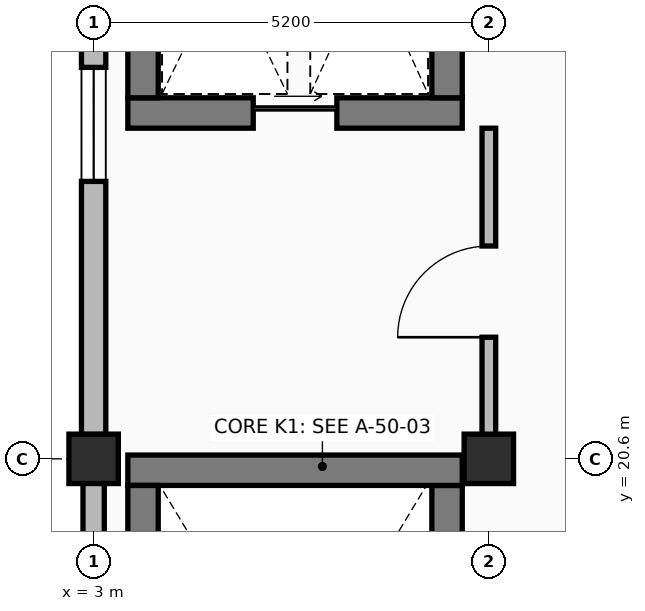
"""IFC4 building model, lengths in metres.
Left out: names, types, materials, properties, quantities, classifications, styles, units other than length and angle.
Written with IfcOpenShell. Run it as: python <this file> out.ifc"""

import sys

from ifc_helpers import new_model, si_unit, direction, frame, frame_2d, origin, origin_2d, place, context, subcontext, project, spatial, rectangle, extrude, element, fill, save


model = new_model("IFC4")
c1 = context("Model", 3, precision=1e-05, world=origin(), true_north=direction((0.0, 1.0)))
c2 = subcontext(c1, "Body", "Model", "MODEL_VIEW")
j1 = project(units=[si_unit("LENGTHUNIT", "METRE"), si_unit("PLANEANGLEUNIT", "RADIAN")], contexts=[c1])
p1 = place(None, origin())
s1 = spatial("IfcSite", under=j1, at=p1, CompositionType="ELEMENT")
p2 = place(p1, origin())
s2 = spatial("IfcBuilding", under=s1, at=p2, CompositionType="ELEMENT")
p3 = place(p2, frame((0.0, 0.0, 14.4)))
s3 = spatial("IfcBuildingStorey", under=s2, at=p3, CompositionType="ELEMENT", Elevation=14.4)
for number, where, z_axis, x_axis in (
    (1, (3.0, 20.6, 0.0), (0.0, 0.0, 1.0), (1.0, 0.0, 0.0)),
    (2, (8.2, 20.6, 0.0), (0.0, 0.0, 1.0), (1.0, 0.0, 0.0)),
):
    element("IfcColumn", number, at=place(p3, frame(where, z_axis=z_axis, x_axis=x_axis)), inside=s3, PredefinedType="COLUMN", context=c2, shape_type="SweptSolid", body=[
        extrude(rectangle(XDim=0.65, YDim=0.65, at=origin_2d()), origin(), (0.0, 0.0, 1.0), 4.5),
    ])
p4 = place(p3, frame((3.0, 20.28, 0.0), z_axis=(0.0, 0.0, 1.0), x_axis=(0.0, -1.0, 0.0)))
e3 = element("IfcWall", 3, at=p4, inside=s3, PredefinedType="SOLIDWALL", context=c2, shape_type="SweptSolid", body=[
    extrude(rectangle(XDim=3.86, YDim=0.28, at=frame_2d((1.93, 0.0))), origin(), (0.0, 0.0, 1.0), 3.475),
])
p5 = place(p4, frame((1.33, 0.0, 0.9)))
e4 = element("IfcOpeningElement", 4, at=p5, cuts=e3, PredefinedType="OPENING", context=c2, shape_type="SweptSolid", body=[
    extrude(rectangle(XDim=1.2, YDim=1.5, at=frame_2d((0.6, 0.75))), frame((0.0, 0.15, 0.0), z_axis=(0.0, -1.0, 0.0), x_axis=(1.0, 0.0, 0.0)), (0.0, 0.0, 1.0), 0.3),
])
p6 = place(p3, frame((3.0, 29.08, 0.0), z_axis=(0.0, 0.0, 1.0), x_axis=(0.0, -1.0, 0.0)))
e5 = element("IfcWall", 5, at=p6, inside=s3, PredefinedType="SOLIDWALL", context=c2, shape_type="SweptSolid", body=[
    extrude(rectangle(XDim=8.16, YDim=0.32, at=frame_2d((4.08, 0.0))), origin(), (0.0, 0.0, 1.0), 3.475),
])
p7 = place(p6, frame((3.33, 0.0, 0.9)))
e6 = element("IfcOpeningElement", 6, at=p7, cuts=e5, PredefinedType="OPENING", context=c2, shape_type="SweptSolid", body=[
    extrude(rectangle(XDim=1.5, YDim=1.5, at=frame_2d((0.75, 0.75))), frame((0.0, 0.17, 0.0), z_axis=(0.0, -1.0, 0.0), x_axis=(1.0, 0.0, 0.0)), (0.0, 0.0, 1.0), 0.34),
])
p8 = place(p3, frame((7.65, 12.6, 0.0), z_axis=(0.0, 0.0, 1.0), x_axis=(0.0, 1.0, 0.0)))
e7 = element("IfcWall", 7, at=p8, inside=s3, PredefinedType="SHEAR", context=c2, shape_type="SweptSolid", body=[
    extrude(rectangle(XDim=7.65, YDim=0.4, at=frame_2d((3.825, 0.0))), origin(), (0.0, 0.0, 1.0), 4.19),
])
p9 = place(p8, frame((0.4, 0.0, 0.0)))
e8 = element("IfcOpeningElement", 8, at=p9, cuts=e7, PredefinedType="OPENING", context=c2, shape_type="SweptSolid", body=[
    extrude(rectangle(XDim=1.1, YDim=2.2, at=frame_2d((0.55, 1.1))), frame((0.0, 0.21, 0.0), z_axis=(0.0, -1.0, 0.0), x_axis=(1.0, 0.0, 0.0)), (0.0, 0.0, 1.0), 0.42),
])
p10 = place(p3, frame((7.85, 20.45, 0.0), z_axis=(0.0, 0.0, 1.0), x_axis=(-1.0, 0.0, 0.0)))
e9 = element("IfcWall", 9, at=p10, inside=s3, PredefinedType="SHEAR", context=c2, shape_type="SweptSolid", body=[
    extrude(rectangle(XDim=4.4, YDim=0.4, at=frame_2d((2.2, 0.0))), origin(), (0.0, 0.0, 1.0), 4.19),
])
p11 = place(p3, frame((3.65, 20.25, 0.0), z_axis=(0.0, 0.0, 1.0), x_axis=(0.0, -1.0, 0.0)))
e10 = element("IfcWall", 10, at=p11, inside=s3, PredefinedType="SHEAR", context=c2, shape_type="SweptSolid", body=[
    extrude(rectangle(XDim=7.65, YDim=0.4, at=frame_2d((3.825, 0.0))), origin(), (0.0, 0.0, 1.0), 4.19),
])
p12 = place(p3, frame((3.45, 25.15, 0.0), z_axis=(0.0, 0.0, 1.0), x_axis=(1.0, 0.0, 0.0)))
e11 = element("IfcWall", 11, at=p12, inside=s3, PredefinedType="SHEAR", context=c2, shape_type="SweptSolid", body=[
    extrude(rectangle(XDim=4.4, YDim=0.4, at=frame_2d((2.2, 0.0))), origin(), (0.0, 0.0, 1.0), 4.19),
])
p13 = place(p12, frame((1.65, 0.0, 0.0)))
e12 = element("IfcOpeningElement", 12, at=p13, cuts=e11, PredefinedType="OPENING", context=c2, shape_type="SweptSolid", body=[
    extrude(rectangle(XDim=1.1, YDim=2.2, at=frame_2d((0.55, 1.1))), frame((0.0, 0.21, 0.0), z_axis=(0.0, -1.0, 0.0), x_axis=(1.0, 0.0, 0.0)), (0.0, 0.0, 1.0), 0.42),
])
for number, where, z_axis, x_axis in (
    (13, (7.65, 25.35, 0.0), (0.0, 0.0, 1.0), (0.0, 1.0, 0.0)),
    (14, (3.65, 28.85, 0.0), (0.0, 0.0, 1.0), (0.0, -1.0, 0.0)),
):
    element("IfcWall", number, at=place(p3, frame(where, z_axis=z_axis, x_axis=x_axis)), inside=s3, PredefinedType="SHEAR", context=c2, shape_type="SweptSolid", body=[
        extrude(rectangle(XDim=3.5, YDim=0.4, at=frame_2d((1.75, 0.0))), origin(), (0.0, 0.0, 1.0), 4.19),
    ])
p14 = place(p3, frame((8.2, 20.65, 0.0), z_axis=(0.0, 0.0, 1.0), x_axis=(0.0, 1.0, 0.0)))
e15 = element("IfcWall", 15, at=p14, inside=s3, PredefinedType="STANDARD", context=c2, shape_type="SweptSolid", body=[
    extrude(rectangle(XDim=4.3, YDim=0.18, at=frame_2d((2.15, 0.0))), origin(), (0.0, 0.0, 1.0), 3.365),
])
p15 = place(p14, frame((1.55, 0.0, 0.0)))
e16 = element("IfcOpeningElement", 16, at=p15, cuts=e15, PredefinedType="OPENING", context=c2, shape_type="SweptSolid", body=[
    extrude(rectangle(XDim=1.2, YDim=2.2, at=frame_2d((0.6, 1.1))), frame((0.0, 0.1, 0.0), z_axis=(0.0, -1.0, 0.0), x_axis=(1.0, 0.0, 0.0)), (0.0, 0.0, 1.0), 0.2),
])
p16 = place(p7, origin())
e17 = element("IfcWindow", 17, at=p16, inside=s3, PartitioningType="SINGLE_PANEL", PredefinedType="WINDOW", context=c2, shape_type="SweptSolid", body=[
    extrude(rectangle(XDim=1.5, YDim=1.5, at=frame_2d((0.75, 0.75))), frame((0.0, 0.03, 0.0), z_axis=(0.0, -1.0, 0.0), x_axis=(1.0, 0.0, 0.0)), (0.0, 0.0, 1.0), 0.06),
])
fill(e6, e17)
p17 = place(p13, origin())
e18 = element("IfcDoor", 18, at=p17, inside=s3, OperationType="SLIDING_TO_RIGHT", PredefinedType="DOOR", context=c2, shape_type="SweptSolid", body=[
    extrude(rectangle(XDim=1.1, YDim=2.2, at=frame_2d((0.55, 1.1))), frame((0.0, 0.025, 0.0), z_axis=(0.0, -1.0, 0.0), x_axis=(1.0, 0.0, 0.0)), (0.0, 0.0, 1.0), 0.05),
])
fill(e12, e18)
p18 = place(p15, origin())
e19 = element("IfcDoor", 19, at=p18, inside=s3, OperationType="SINGLE_SWING_LEFT", PredefinedType="DOOR", context=c2, shape_type="SweptSolid", body=[
    extrude(rectangle(XDim=1.2, YDim=2.2, at=frame_2d((0.6, 1.1))), frame((0.0, 0.025, 0.0), z_axis=(0.0, -1.0, 0.0), x_axis=(1.0, 0.0, 0.0)), (0.0, 0.0, 1.0), 0.05),
])
fill(e16, e19)
save(model, sys.argv[1])
